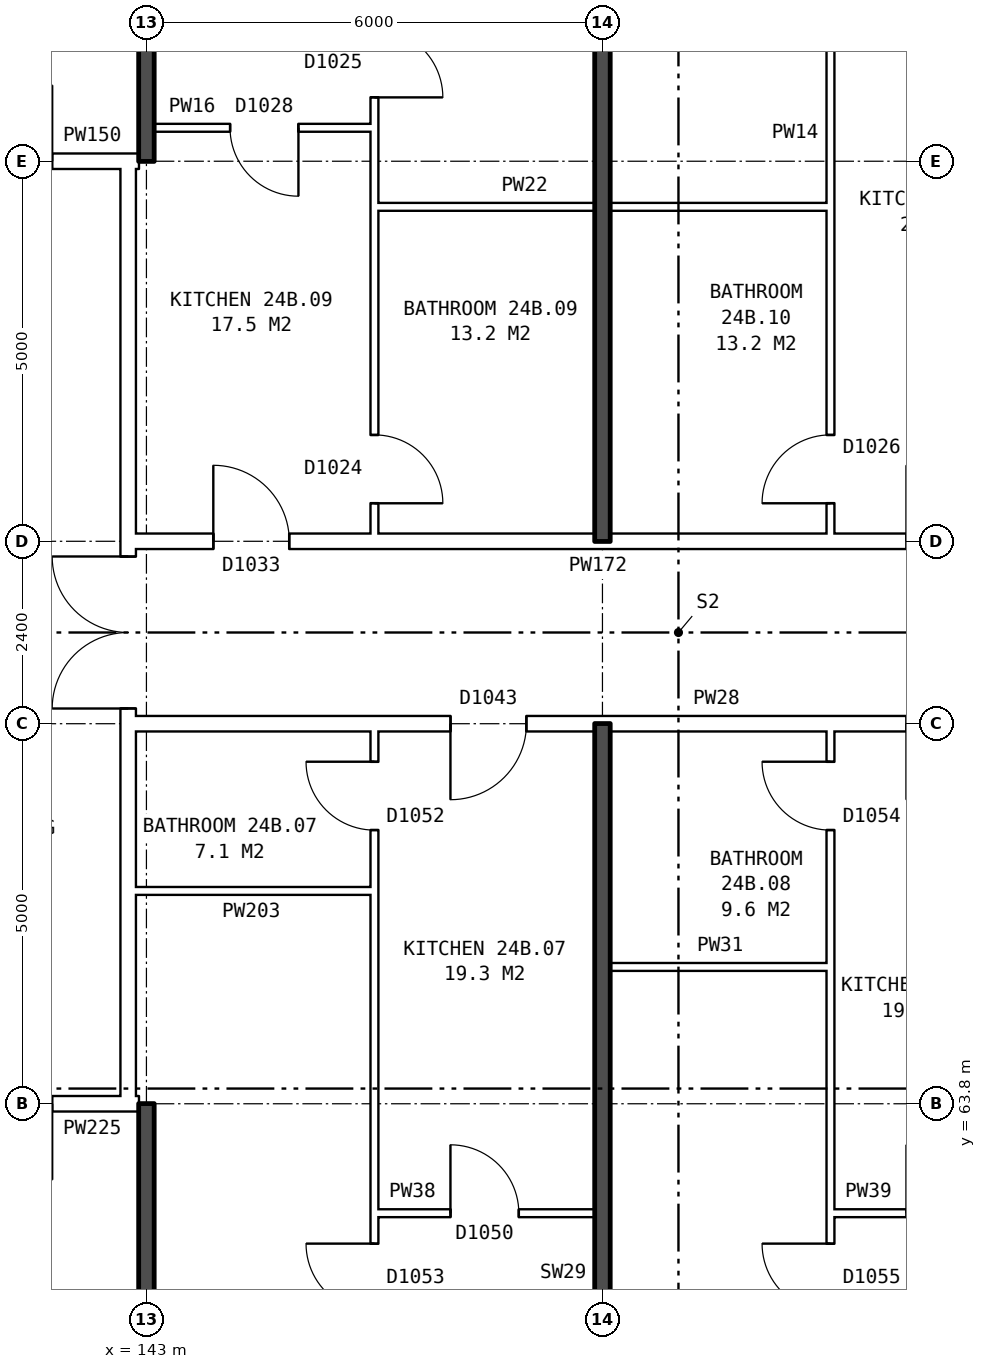
"""IFC4 building model, lengths in metres.
Left out: names, types, materials, properties, quantities, classifications, styles, units other than length and angle.
Written with IfcOpenShell. Run it as: python <this file> out.ifc"""

import sys

from ifc_helpers import new_model, si_unit, direction, frame, frame_2d, origin, place, context, subcontext, project, spatial, rectangle, extrude, element, fill, save


model = new_model("IFC4")
c1 = context("Model", 3, precision=1e-05, world=origin(), true_north=direction((0.0, 1.0)))
c2 = subcontext(c1, "Body", "Model", "MODEL_VIEW")
j1 = project(units=[si_unit("LENGTHUNIT", "METRE"), si_unit("PLANEANGLEUNIT", "RADIAN")], contexts=[c1])
p1 = place(None, origin())
s1 = spatial("IfcSite", under=j1, at=p1, CompositionType="ELEMENT")
p2 = place(p1, origin())
s2 = spatial("IfcBuilding", under=s1, at=p2, CompositionType="ELEMENT")
p3 = place(p2, frame((0.0, 0.0, 87.1)))
s3 = spatial("IfcBuildingStorey", under=s2, at=p3, CompositionType="ELEMENT", Elevation=87.1)
p4 = place(p3, frame((142.76, 63.9, 0.0), z_axis=(0.0, 0.0, 1.0), x_axis=(0.0, 1.0, 0.0)))
e1 = element("IfcWall", 1, at=p4, inside=s3, PredefinedType="PARTITIONING", context=c2, shape_type="SweptSolid", body=[
    extrude(rectangle(XDim=12.2, YDim=0.2, at=frame_2d((6.1, 0.0))), origin(), (0.0, 0.0, 1.0), 2.85),
])
p5 = place(p4, frame((5.1, 0.0, 0.0)))
e2 = element("IfcOpeningElement", 2, at=p5, cuts=e1, PredefinedType="OPENING", context=c2, shape_type="SweptSolid", body=[
    extrude(rectangle(XDim=2.0, YDim=2.1, at=frame_2d((1.0, 1.05))), frame((0.0, 0.11, 0.0), z_axis=(0.0, -1.0, 0.0), x_axis=(1.0, 0.0, 0.0)), (0.0, 0.0, 1.0), 0.22),
])
p6 = place(p3, frame((146.0, 62.36, 0.0), z_axis=(0.0, 0.0, 1.0), x_axis=(1.0, 0.0, 0.0)))
e3 = element("IfcWall", 3, at=p6, inside=s3, PredefinedType="PARTITIONING", context=c2, shape_type="SweptSolid", body=[
    extrude(rectangle(XDim=2.9, YDim=0.1, at=frame_2d((1.45, 0.0))), origin(), (0.0, 0.0, 1.0), 2.85),
])
p7 = place(p6, frame((1.0, 0.0, 0.0)))
e4 = element("IfcOpeningElement", 4, at=p7, cuts=e3, PredefinedType="OPENING", context=c2, shape_type="SweptSolid", body=[
    extrude(rectangle(XDim=0.9, YDim=2.1, at=frame_2d((0.45, 1.05))), frame((0.0, 0.06, 0.0), z_axis=(0.0, -1.0, 0.0), x_axis=(1.0, 0.0, 0.0)), (0.0, 0.0, 1.0), 0.12),
])
p8 = place(p3, frame((152.0, 62.36, 0.0), z_axis=(0.0, 0.0, 1.0), x_axis=(1.0, 0.0, 0.0)))
e5 = element("IfcWall", 5, at=p8, inside=s3, PredefinedType="PARTITIONING", context=c2, shape_type="SweptSolid", body=[
    extrude(rectangle(XDim=2.9, YDim=0.1, at=frame_2d((1.45, 0.0))), origin(), (0.0, 0.0, 1.0), 2.85),
])
p9 = place(p8, frame((1.0, 0.0, 0.0)))
e6 = element("IfcOpeningElement", 6, at=p9, cuts=e5, PredefinedType="OPENING", context=c2, shape_type="SweptSolid", body=[
    extrude(rectangle(XDim=0.9, YDim=2.1, at=frame_2d((0.45, 1.05))), frame((0.0, 0.06, 0.0), z_axis=(0.0, -1.0, 0.0), x_axis=(1.0, 0.0, 0.0)), (0.0, 0.0, 1.0), 0.12),
])
p10 = place(p3, frame((139.76, 63.8, 0.0), z_axis=(0.0, 0.0, 1.0), x_axis=(1.0, 0.0, 0.0)))
e7 = element("IfcWall", 7, at=p10, inside=s3, PredefinedType="PARTITIONING", context=c2, shape_type="SweptSolid", body=[
    extrude(rectangle(XDim=3.0, YDim=0.2, at=frame_2d((1.5, 0.0))), origin(), (0.0, 0.0, 1.0), 2.85),
])
p11 = place(p10, frame((1.0, 0.0, 0.0)))
e8 = element("IfcOpeningElement", 8, at=p11, cuts=e7, PredefinedType="OPENING", context=c2, shape_type="SweptSolid", body=[
    extrude(rectangle(XDim=1.0, YDim=2.1, at=frame_2d((0.5, 1.05))), frame((0.0, 0.11, 0.0), z_axis=(0.0, -1.0, 0.0), x_axis=(1.0, 0.0, 0.0)), (0.0, 0.0, 1.0), 0.22),
])
p12 = place(p3, frame((142.76, 63.8, 0.0), z_axis=(0.0, 0.0, 1.0), x_axis=(1.0, 0.0, 0.0)))
e9 = element("IfcWall", 9, at=p12, inside=s3, PredefinedType="PARTITIONING", context=c2, shape_type="SweptSolid", body=[
    extrude(rectangle(XDim=0.14, YDim=0.2, at=frame_2d((0.07, 0.0))), origin(), (0.0, 0.0, 1.0), 2.85),
])
p13 = place(p3, frame((149.1, 65.6, 0.0), z_axis=(0.0, 0.0, 1.0), x_axis=(1.0, 0.0, 0.0)))
e10 = element("IfcWall", 10, at=p13, inside=s3, PredefinedType="PARTITIONING", context=c2, shape_type="SweptSolid", body=[
    extrude(rectangle(XDim=2.9, YDim=0.1, at=frame_2d((1.45, 0.0))), origin(), (0.0, 0.0, 1.0), 2.85),
])
p14 = place(p3, frame((142.76, 66.6, 0.0), z_axis=(0.0, 0.0, 1.0), x_axis=(1.0, 0.0, 0.0)))
e11 = element("IfcWall", 11, at=p14, inside=s3, PredefinedType="PARTITIONING", context=c2, shape_type="SweptSolid", body=[
    extrude(rectangle(XDim=3.24, YDim=0.1, at=frame_2d((1.62, 0.0))), origin(), (0.0, 0.0, 1.0), 2.85),
])
p15 = place(p3, frame((142.76, 68.8, 0.0), z_axis=(0.0, 0.0, 1.0), x_axis=(1.0, 0.0, 0.0)))
e12 = element("IfcWall", 12, at=p15, inside=s3, PredefinedType="PARTITIONING", context=c2, shape_type="SweptSolid", body=[
    extrude(rectangle(XDim=14.48, YDim=0.2, at=frame_2d((7.24, 0.0))), origin(), (0.0, 0.0, 1.0), 2.85),
])
p16 = place(p15, frame((4.24, 0.0, 0.0)))
e13 = element("IfcOpeningElement", 13, at=p16, cuts=e12, PredefinedType="OPENING", context=c2, shape_type="SweptSolid", body=[
    extrude(rectangle(XDim=1.0, YDim=2.1, at=frame_2d((0.5, 1.05))), frame((0.0, 0.11, 0.0), z_axis=(0.0, -1.0, 0.0), x_axis=(1.0, 0.0, 0.0)), (0.0, 0.0, 1.0), 0.22),
])
p17 = place(p15, frame((10.24, 0.0, 0.0)))
e14 = element("IfcOpeningElement", 14, at=p17, cuts=e12, PredefinedType="OPENING", context=c2, shape_type="SweptSolid", body=[
    extrude(rectangle(XDim=1.0, YDim=2.1, at=frame_2d((0.5, 1.05))), frame((0.0, 0.11, 0.0), z_axis=(0.0, -1.0, 0.0), x_axis=(1.0, 0.0, 0.0)), (0.0, 0.0, 1.0), 0.22),
])
p18 = place(p3, frame((142.76, 71.2, 0.0), z_axis=(0.0, 0.0, 1.0), x_axis=(1.0, 0.0, 0.0)))
e15 = element("IfcWall", 15, at=p18, inside=s3, PredefinedType="PARTITIONING", context=c2, shape_type="SweptSolid", body=[
    extrude(rectangle(XDim=14.48, YDim=0.2, at=frame_2d((7.24, 0.0))), origin(), (0.0, 0.0, 1.0), 2.85),
])
p19 = place(p18, frame((1.12, 0.0, 0.0)))
e16 = element("IfcOpeningElement", 16, at=p19, cuts=e15, PredefinedType="OPENING", context=c2, shape_type="SweptSolid", body=[
    extrude(rectangle(XDim=1.0, YDim=2.1, at=frame_2d((0.5, 1.05))), frame((0.0, 0.11, 0.0), z_axis=(0.0, -1.0, 0.0), x_axis=(1.0, 0.0, 0.0)), (0.0, 0.0, 1.0), 0.22),
])
p20 = place(p18, frame((10.24, 0.0, 0.0)))
e17 = element("IfcOpeningElement", 17, at=p20, cuts=e15, PredefinedType="OPENING", context=c2, shape_type="SweptSolid", body=[
    extrude(rectangle(XDim=1.0, YDim=2.1, at=frame_2d((0.5, 1.05))), frame((0.0, 0.11, 0.0), z_axis=(0.0, -1.0, 0.0), x_axis=(1.0, 0.0, 0.0)), (0.0, 0.0, 1.0), 0.22),
])
p21 = place(p3, frame((146.0, 75.6, 0.0), z_axis=(0.0, 0.0, 1.0), x_axis=(1.0, 0.0, 0.0)))
e18 = element("IfcWall", 18, at=p21, inside=s3, PredefinedType="PARTITIONING", context=c2, shape_type="SweptSolid", body=[
    extrude(rectangle(XDim=6.0, YDim=0.1, at=frame_2d((3.0, 0.0))), origin(), (0.0, 0.0, 1.0), 2.85),
])
p22 = place(p3, frame((139.76, 76.2, 0.0), z_axis=(0.0, 0.0, 1.0), x_axis=(1.0, 0.0, 0.0)))
e19 = element("IfcWall", 19, at=p22, inside=s3, PredefinedType="PARTITIONING", context=c2, shape_type="SweptSolid", body=[
    extrude(rectangle(XDim=3.0, YDim=0.2, at=frame_2d((1.5, 0.0))), origin(), (0.0, 0.0, 1.0), 2.85),
])
p23 = place(p22, frame((1.0, 0.0, 0.0)))
e20 = element("IfcOpeningElement", 20, at=p23, cuts=e19, PredefinedType="OPENING", context=c2, shape_type="SweptSolid", body=[
    extrude(rectangle(XDim=1.0, YDim=2.1, at=frame_2d((0.5, 1.05))), frame((0.0, 0.11, 0.0), z_axis=(0.0, -1.0, 0.0), x_axis=(1.0, 0.0, 0.0)), (0.0, 0.0, 1.0), 0.22),
])
p24 = place(p3, frame((142.76, 76.2, 0.0), z_axis=(0.0, 0.0, 1.0), x_axis=(1.0, 0.0, 0.0)))
e21 = element("IfcWall", 21, at=p24, inside=s3, PredefinedType="PARTITIONING", context=c2, shape_type="SweptSolid", body=[
    extrude(rectangle(XDim=0.14, YDim=0.2, at=frame_2d((0.07, 0.0))), origin(), (0.0, 0.0, 1.0), 2.85),
])
p25 = place(p3, frame((143.1, 76.64, 0.0), z_axis=(0.0, 0.0, 1.0), x_axis=(1.0, 0.0, 0.0)))
e22 = element("IfcWall", 22, at=p25, inside=s3, PredefinedType="PARTITIONING", context=c2, shape_type="SweptSolid", body=[
    extrude(rectangle(XDim=2.9, YDim=0.1, at=frame_2d((1.45, 0.0))), origin(), (0.0, 0.0, 1.0), 2.85),
])
p26 = place(p25, frame((1.0, 0.0, 0.0)))
e23 = element("IfcOpeningElement", 23, at=p26, cuts=e22, PredefinedType="OPENING", context=c2, shape_type="SweptSolid", body=[
    extrude(rectangle(XDim=0.9, YDim=2.1, at=frame_2d((0.45, 1.05))), frame((0.0, 0.06, 0.0), z_axis=(0.0, -1.0, 0.0), x_axis=(1.0, 0.0, 0.0)), (0.0, 0.0, 1.0), 0.12),
])
for number, where, z_axis, x_axis in (
    (24, (143.0, 54.36, 0.0), (0.0, 0.0, 1.0), (0.0, 1.0, 0.0)),
    (25, (143.0, 76.2, 0.0), (0.0, 0.0, 1.0), (0.0, 1.0, 0.0)),
):
    element("IfcWall", number, at=place(p3, frame(where, z_axis=z_axis, x_axis=x_axis)), inside=s3, PredefinedType="SOLIDWALL", context=c2, shape_type="SweptSolid", body=[
        extrude(rectangle(XDim=9.44, YDim=0.2, at=frame_2d((4.72, 0.0))), origin(), (0.0, 0.0, 1.0), 2.85),
    ])
p27 = place(p3, frame((146.0, 54.36, 0.0), z_axis=(0.0, 0.0, 1.0), x_axis=(0.0, 1.0, 0.0)))
e26 = element("IfcWall", 26, at=p27, inside=s3, PredefinedType="PARTITIONING", context=c2, shape_type="SweptSolid", body=[
    extrude(rectangle(XDim=14.34, YDim=0.1, at=frame_2d((7.17, 0.0))), origin(), (0.0, 0.0, 1.0), 2.85),
])
p28 = place(p27, frame((6.7, 0.0, 0.0)))
e27 = element("IfcOpeningElement", 27, at=p28, cuts=e26, PredefinedType="OPENING", context=c2, shape_type="SweptSolid", body=[
    extrude(rectangle(XDim=0.9, YDim=2.1, at=frame_2d((0.45, 1.05))), frame((0.0, 0.06, 0.0), z_axis=(0.0, -1.0, 0.0), x_axis=(1.0, 0.0, 0.0)), (0.0, 0.0, 1.0), 0.12),
])
p29 = place(p27, frame((13.04, 0.0, 0.0)))
e28 = element("IfcOpeningElement", 28, at=p29, cuts=e26, PredefinedType="OPENING", context=c2, shape_type="SweptSolid", body=[
    extrude(rectangle(XDim=0.9, YDim=2.1, at=frame_2d((0.45, 1.05))), frame((0.0, 0.06, 0.0), z_axis=(0.0, -1.0, 0.0), x_axis=(1.0, 0.0, 0.0)), (0.0, 0.0, 1.0), 0.12),
])
p30 = place(p3, frame((146.0, 71.3, 0.0), z_axis=(0.0, 0.0, 1.0), x_axis=(0.0, 1.0, 0.0)))
e29 = element("IfcWall", 29, at=p30, inside=s3, PredefinedType="PARTITIONING", context=c2, shape_type="SweptSolid", body=[
    extrude(rectangle(XDim=14.34, YDim=0.1, at=frame_2d((7.17, 0.0))), origin(), (0.0, 0.0, 1.0), 2.85),
])
p31 = place(p30, frame((5.74, 0.0, 0.0)))
e30 = element("IfcOpeningElement", 30, at=p31, cuts=e29, PredefinedType="OPENING", context=c2, shape_type="SweptSolid", body=[
    extrude(rectangle(XDim=0.9, YDim=2.1, at=frame_2d((0.45, 1.05))), frame((0.0, 0.06, 0.0), z_axis=(0.0, -1.0, 0.0), x_axis=(1.0, 0.0, 0.0)), (0.0, 0.0, 1.0), 0.12),
])
p32 = place(p30, frame((0.4, 0.0, 0.0)))
e31 = element("IfcOpeningElement", 31, at=p32, cuts=e29, PredefinedType="OPENING", context=c2, shape_type="SweptSolid", body=[
    extrude(rectangle(XDim=0.9, YDim=2.1, at=frame_2d((0.45, 1.05))), frame((0.0, 0.06, 0.0), z_axis=(0.0, -1.0, 0.0), x_axis=(1.0, 0.0, 0.0)), (0.0, 0.0, 1.0), 0.12),
])
for number, where, z_axis, x_axis in (
    (32, (149.0, 54.36, 0.0), (0.0, 0.0, 1.0), (0.0, 1.0, 0.0)),
    (33, (149.0, 71.2, 0.0), (0.0, 0.0, 1.0), (0.0, 1.0, 0.0)),
):
    element("IfcWall", number, at=place(p3, frame(where, z_axis=z_axis, x_axis=x_axis)), inside=s3, PredefinedType="SOLIDWALL", context=c2, shape_type="SweptSolid", body=[
        extrude(rectangle(XDim=14.44, YDim=0.2, at=frame_2d((7.22, 0.0))), origin(), (0.0, 0.0, 1.0), 2.85),
    ])
p33 = place(p3, frame((152.0, 54.36, 0.0), z_axis=(0.0, 0.0, 1.0), x_axis=(0.0, 1.0, 0.0)))
e34 = element("IfcWall", 34, at=p33, inside=s3, PredefinedType="PARTITIONING", context=c2, shape_type="SweptSolid", body=[
    extrude(rectangle(XDim=14.34, YDim=0.1, at=frame_2d((7.17, 0.0))), origin(), (0.0, 0.0, 1.0), 2.85),
])
p34 = place(p33, frame((6.7, 0.0, 0.0)))
e35 = element("IfcOpeningElement", 35, at=p34, cuts=e34, PredefinedType="OPENING", context=c2, shape_type="SweptSolid", body=[
    extrude(rectangle(XDim=0.9, YDim=2.1, at=frame_2d((0.45, 1.05))), frame((0.0, 0.06, 0.0), z_axis=(0.0, -1.0, 0.0), x_axis=(1.0, 0.0, 0.0)), (0.0, 0.0, 1.0), 0.12),
])
p35 = place(p33, frame((13.04, 0.0, 0.0)))
e36 = element("IfcOpeningElement", 36, at=p35, cuts=e34, PredefinedType="OPENING", context=c2, shape_type="SweptSolid", body=[
    extrude(rectangle(XDim=0.9, YDim=2.1, at=frame_2d((0.45, 1.05))), frame((0.0, 0.06, 0.0), z_axis=(0.0, -1.0, 0.0), x_axis=(1.0, 0.0, 0.0)), (0.0, 0.0, 1.0), 0.12),
])
p36 = place(p3, frame((152.0, 71.3, 0.0), z_axis=(0.0, 0.0, 1.0), x_axis=(0.0, 1.0, 0.0)))
e37 = element("IfcWall", 37, at=p36, inside=s3, PredefinedType="PARTITIONING", context=c2, shape_type="SweptSolid", body=[
    extrude(rectangle(XDim=14.34, YDim=0.1, at=frame_2d((7.17, 0.0))), origin(), (0.0, 0.0, 1.0), 2.85),
])
p37 = place(p36, frame((9.24, 0.0, 0.0)))
e38 = element("IfcOpeningElement", 38, at=p37, cuts=e37, PredefinedType="OPENING", context=c2, shape_type="SweptSolid", body=[
    extrude(rectangle(XDim=0.9, YDim=2.1, at=frame_2d((0.45, 1.05))), frame((0.0, 0.06, 0.0), z_axis=(0.0, -1.0, 0.0), x_axis=(1.0, 0.0, 0.0)), (0.0, 0.0, 1.0), 0.12),
])
p38 = place(p36, frame((0.4, 0.0, 0.0)))
e39 = element("IfcOpeningElement", 39, at=p38, cuts=e37, PredefinedType="OPENING", context=c2, shape_type="SweptSolid", body=[
    extrude(rectangle(XDim=0.9, YDim=2.1, at=frame_2d((0.45, 1.05))), frame((0.0, 0.06, 0.0), z_axis=(0.0, -1.0, 0.0), x_axis=(1.0, 0.0, 0.0)), (0.0, 0.0, 1.0), 0.12),
])
p39 = place(p5, origin())
e40 = element("IfcDoor", 40, at=p39, inside=s3, OperationType="DOUBLE_DOOR_SINGLE_SWING", PredefinedType="DOOR", context=c2, shape_type="SweptSolid", body=[
    extrude(rectangle(XDim=2.0, YDim=2.1, at=frame_2d((1.0, 1.05))), frame((0.0, 0.025, 0.0), z_axis=(0.0, -1.0, 0.0), x_axis=(1.0, 0.0, 0.0)), (0.0, 0.0, 1.0), 0.05),
])
fill(e2, e40)
p40 = place(p28, origin())
e41 = element("IfcDoor", 41, at=p40, inside=s3, OperationType="SINGLE_SWING_RIGHT", PredefinedType="DOOR", context=c2, shape_type="SweptSolid", body=[
    extrude(rectangle(XDim=0.9, YDim=2.1, at=frame_2d((0.45, 1.05))), frame((0.0, 0.025, 0.0), z_axis=(0.0, -1.0, 0.0), x_axis=(1.0, 0.0, 0.0)), (0.0, 0.0, 1.0), 0.05),
])
fill(e27, e41)
p41 = place(p16, frame((1.0, 0.0, 0.0), z_axis=(0.0, 0.0, 1.0), x_axis=(-1.0, 0.0, 0.0)))
e42 = element("IfcDoor", 42, at=p41, inside=s3, OperationType="SINGLE_SWING_RIGHT", PredefinedType="DOOR", context=c2, shape_type="SweptSolid", body=[
    extrude(rectangle(XDim=1.0, YDim=2.1, at=frame_2d((0.5, 1.05))), frame((0.0, 0.025, 0.0), z_axis=(0.0, -1.0, 0.0), x_axis=(1.0, 0.0, 0.0)), (0.0, 0.0, 1.0), 0.05),
])
fill(e13, e42)
p42 = place(p7, origin())
e43 = element("IfcDoor", 43, at=p42, inside=s3, OperationType="SINGLE_SWING_LEFT", PredefinedType="DOOR", context=c2, shape_type="SweptSolid", body=[
    extrude(rectangle(XDim=0.9, YDim=2.1, at=frame_2d((0.45, 1.05))), frame((0.0, 0.025, 0.0), z_axis=(0.0, -1.0, 0.0), x_axis=(1.0, 0.0, 0.0)), (0.0, 0.0, 1.0), 0.05),
])
fill(e4, e43)
p43 = place(p29, origin())
e44 = element("IfcDoor", 44, at=p43, inside=s3, OperationType="SINGLE_SWING_RIGHT", PredefinedType="DOOR", context=c2, shape_type="SweptSolid", body=[
    extrude(rectangle(XDim=0.9, YDim=2.1, at=frame_2d((0.45, 1.05))), frame((0.0, 0.025, 0.0), z_axis=(0.0, -1.0, 0.0), x_axis=(1.0, 0.0, 0.0)), (0.0, 0.0, 1.0), 0.05),
])
fill(e28, e44)
p44 = place(p34, origin())
e45 = element("IfcDoor", 45, at=p44, inside=s3, OperationType="SINGLE_SWING_RIGHT", PredefinedType="DOOR", context=c2, shape_type="SweptSolid", body=[
    extrude(rectangle(XDim=0.9, YDim=2.1, at=frame_2d((0.45, 1.05))), frame((0.0, 0.025, 0.0), z_axis=(0.0, -1.0, 0.0), x_axis=(1.0, 0.0, 0.0)), (0.0, 0.0, 1.0), 0.05),
])
fill(e35, e45)
p45 = place(p35, origin())
e46 = element("IfcDoor", 46, at=p45, inside=s3, OperationType="SINGLE_SWING_RIGHT", PredefinedType="DOOR", context=c2, shape_type="SweptSolid", body=[
    extrude(rectangle(XDim=0.9, YDim=2.1, at=frame_2d((0.45, 1.05))), frame((0.0, 0.025, 0.0), z_axis=(0.0, -1.0, 0.0), x_axis=(1.0, 0.0, 0.0)), (0.0, 0.0, 1.0), 0.05),
])
fill(e36, e46)
p46 = place(p31, frame((0.9, 0.0, 0.0), z_axis=(0.0, 0.0, 1.0), x_axis=(-1.0, 0.0, 0.0)))
e47 = element("IfcDoor", 47, at=p46, inside=s3, OperationType="SINGLE_SWING_RIGHT", PredefinedType="DOOR", context=c2, shape_type="SweptSolid", body=[
    extrude(rectangle(XDim=0.9, YDim=2.1, at=frame_2d((0.45, 1.05))), frame((0.0, 0.025, 0.0), z_axis=(0.0, -1.0, 0.0), x_axis=(1.0, 0.0, 0.0)), (0.0, 0.0, 1.0), 0.05),
])
fill(e30, e47)
p47 = place(p19, origin())
e48 = element("IfcDoor", 48, at=p47, inside=s3, OperationType="SINGLE_SWING_LEFT", PredefinedType="DOOR", context=c2, shape_type="SweptSolid", body=[
    extrude(rectangle(XDim=1.0, YDim=2.1, at=frame_2d((0.5, 1.05))), frame((0.0, 0.025, 0.0), z_axis=(0.0, -1.0, 0.0), x_axis=(1.0, 0.0, 0.0)), (0.0, 0.0, 1.0), 0.05),
])
fill(e16, e48)
p48 = place(p26, frame((0.9, 0.0, 0.0), z_axis=(0.0, 0.0, 1.0), x_axis=(-1.0, 0.0, 0.0)))
e49 = element("IfcDoor", 49, at=p48, inside=s3, OperationType="SINGLE_SWING_LEFT", PredefinedType="DOOR", context=c2, shape_type="SweptSolid", body=[
    extrude(rectangle(XDim=0.9, YDim=2.1, at=frame_2d((0.45, 1.05))), frame((0.0, 0.025, 0.0), z_axis=(0.0, -1.0, 0.0), x_axis=(1.0, 0.0, 0.0)), (0.0, 0.0, 1.0), 0.05),
])
fill(e23, e49)
p49 = place(p32, frame((0.9, 0.0, 0.0), z_axis=(0.0, 0.0, 1.0), x_axis=(-1.0, 0.0, 0.0)))
e50 = element("IfcDoor", 50, at=p49, inside=s3, OperationType="SINGLE_SWING_RIGHT", PredefinedType="DOOR", context=c2, shape_type="SweptSolid", body=[
    extrude(rectangle(XDim=0.9, YDim=2.1, at=frame_2d((0.45, 1.05))), frame((0.0, 0.025, 0.0), z_axis=(0.0, -1.0, 0.0), x_axis=(1.0, 0.0, 0.0)), (0.0, 0.0, 1.0), 0.05),
])
fill(e31, e50)
p50 = place(p38, origin())
e51 = element("IfcDoor", 51, at=p50, inside=s3, OperationType="SINGLE_SWING_LEFT", PredefinedType="DOOR", context=c2, shape_type="SweptSolid", body=[
    extrude(rectangle(XDim=0.9, YDim=2.1, at=frame_2d((0.45, 1.05))), frame((0.0, 0.025, 0.0), z_axis=(0.0, -1.0, 0.0), x_axis=(1.0, 0.0, 0.0)), (0.0, 0.0, 1.0), 0.05),
])
fill(e39, e51)
save(model, sys.argv[1])
